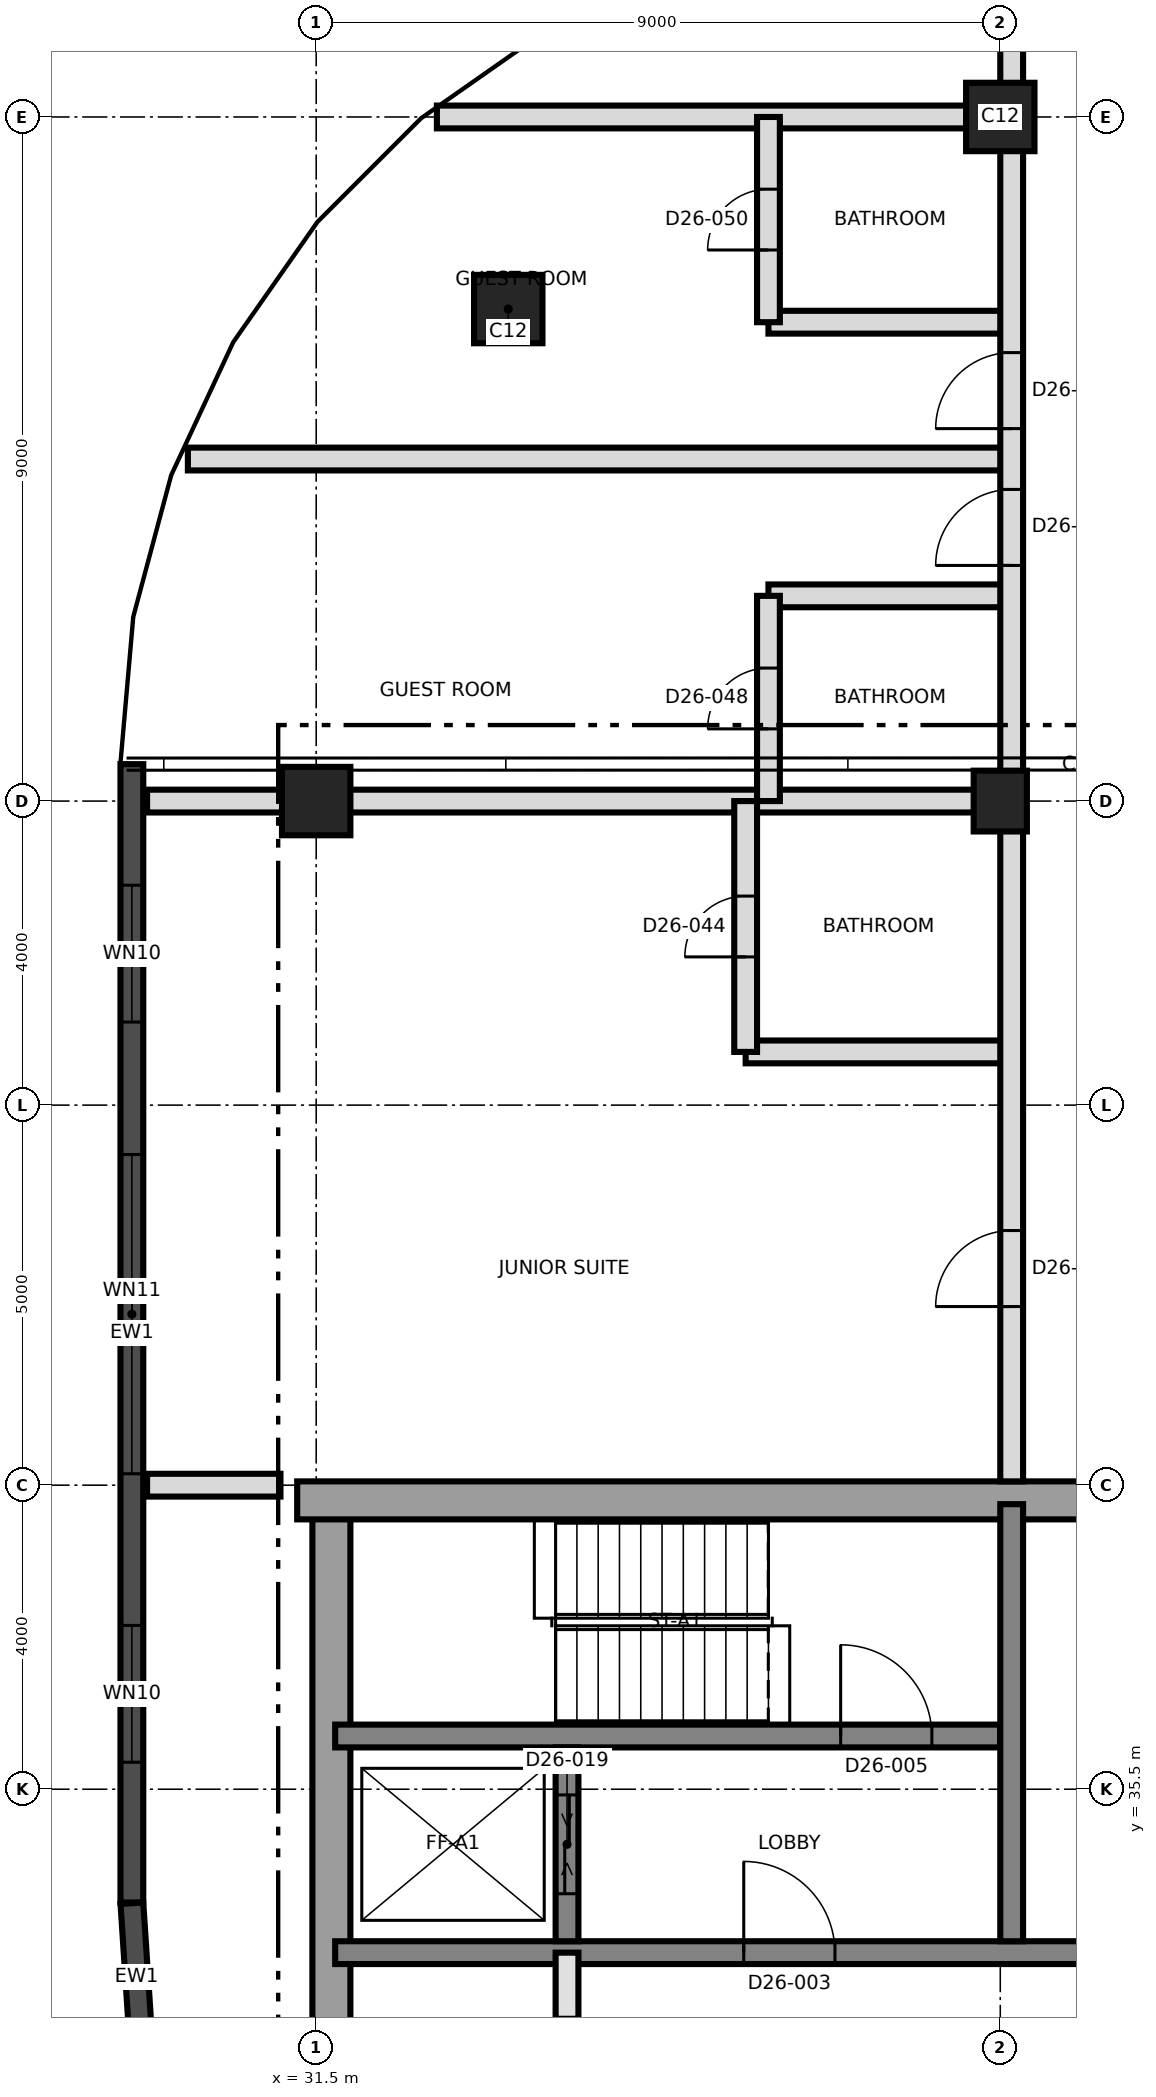
"""IFC4 building model, lengths in metres.
Left out: names, types, materials, properties, quantities, classifications, styles, units other than length and angle.
Written with IfcOpenShell. Run it as: python <this file> out.ifc"""

import sys

from ifc_helpers import new_model, si_unit, direction, frame, frame_2d, origin, origin_2d, place, context, subcontext, project, spatial, rectangle, extrude, element, fill, save


model = new_model("IFC4")
c1 = context("Model", 3, precision=1e-05, world=origin(), true_north=direction((0.0, 1.0)))
c2 = subcontext(c1, "Body", "Model", "MODEL_VIEW")
j1 = project(units=[si_unit("LENGTHUNIT", "METRE"), si_unit("PLANEANGLEUNIT", "RADIAN")], contexts=[c1])
p1 = place(None, origin())
s1 = spatial("IfcSite", under=j1, at=p1, CompositionType="ELEMENT")
p2 = place(p1, origin())
s2 = spatial("IfcBuilding", under=s1, at=p2, CompositionType="ELEMENT")
p3 = place(p2, frame((0.0, 0.0, 232.8)))
s3 = spatial("IfcBuildingStorey", under=s2, at=p3, CompositionType="ELEMENT", Elevation=232.8)
p4 = place(p3, frame((31.7, 21.75, 0.0), z_axis=(0.0, 0.0, 1.0), x_axis=(0.0, 1.0, 0.0)))
e1 = element("IfcWall", 1, at=p4, inside=s3, PredefinedType="SHEAR", context=c2, shape_type="SweptSolid", body=[
    extrude(rectangle(XDim=17.5, YDim=0.5, at=frame_2d((8.75, 0.0))), origin(), (0.0, 0.0, 1.0), 3.7),
])
p5 = place(p3, frame((31.25, 39.3, 0.0), z_axis=(0.0, 0.0, 1.0), x_axis=(1.0, 0.0, 0.0)))
e2 = element("IfcWall", 2, at=p5, inside=s3, PredefinedType="SHEAR", context=c2, shape_type="SweptSolid", body=[
    extrude(rectangle(XDim=27.0, YDim=0.5, at=frame_2d((13.5, 0.0))), origin(), (0.0, 0.0, 1.0), 3.7),
])
p6 = place(p5, frame((10.45, 0.0, 0.0)))
e3 = element("IfcOpeningElement", 3, at=p6, cuts=e2, PredefinedType="OPENING", context=c2, shape_type="SweptSolid", body=[
    extrude(rectangle(XDim=1.2, YDim=2.1, at=frame_2d((0.6, 1.05))), frame((0.0, 0.26, 0.0), z_axis=(0.0, -1.0, 0.0), x_axis=(1.0, 0.0, 0.0)), (0.0, 0.0, 1.0), 0.52),
])
p7 = place(p3, frame((31.75, 33.35, 0.0), z_axis=(0.0, 0.0, 1.0), x_axis=(1.0, 0.0, 0.0)))
e4 = element("IfcWall", 4, at=p7, inside=s3, PredefinedType="SHEAR", context=c2, shape_type="SweptSolid", body=[
    extrude(rectangle(XDim=26.5, YDim=0.3, at=frame_2d((13.25, 0.0))), origin(), (0.0, 0.0, 1.0), 3.7),
])
p8 = place(p7, frame((13.9, 0.0, 0.0)))
e5 = element("IfcOpeningElement", 5, at=p8, cuts=e4, PredefinedType="OPENING", context=c2, shape_type="SweptSolid", body=[
    extrude(rectangle(XDim=1.4, YDim=2.1, at=frame_2d((0.7, 1.05))), frame((0.0, 0.16, 0.0), z_axis=(0.0, -1.0, 0.0), x_axis=(1.0, 0.0, 0.0)), (0.0, 0.0, 1.0), 0.32),
])
p9 = place(p7, frame((5.375, 0.0, 0.0)))
e6 = element("IfcOpeningElement", 6, at=p9, cuts=e4, PredefinedType="OPENING", context=c2, shape_type="SweptSolid", body=[
    extrude(rectangle(XDim=1.2, YDim=2.1, at=frame_2d((0.6, 1.05))), frame((0.0, 0.16, 0.0), z_axis=(0.0, -1.0, 0.0), x_axis=(1.0, 0.0, 0.0)), (0.0, 0.0, 1.0), 0.32),
])
p10 = place(p7, frame((19.925, 0.0, 0.0)))
e7 = element("IfcOpeningElement", 7, at=p10, cuts=e4, PredefinedType="OPENING", context=c2, shape_type="SweptSolid", body=[
    extrude(rectangle(XDim=1.2, YDim=2.1, at=frame_2d((0.6, 1.05))), frame((0.0, 0.16, 0.0), z_axis=(0.0, -1.0, 0.0), x_axis=(1.0, 0.0, 0.0)), (0.0, 0.0, 1.0), 0.32),
])
p11 = place(p3, frame((31.75, 36.2, 0.0), z_axis=(0.0, 0.0, 1.0), x_axis=(1.0, 0.0, 0.0)))
e8 = element("IfcWall", 8, at=p11, inside=s3, PredefinedType="SHEAR", context=c2, shape_type="SweptSolid", body=[
    extrude(rectangle(XDim=8.75, YDim=0.3, at=frame_2d((4.375, 0.0))), origin(), (0.0, 0.0, 1.0), 3.7),
])
p12 = place(p11, frame((6.65, 0.0, 0.0)))
e9 = element("IfcOpeningElement", 9, at=p12, cuts=e8, PredefinedType="OPENING", context=c2, shape_type="SweptSolid", body=[
    extrude(rectangle(XDim=1.2, YDim=2.1, at=frame_2d((0.6, 1.05))), frame((0.0, 0.16, 0.0), z_axis=(0.0, -1.0, 0.0), x_axis=(1.0, 0.0, 0.0)), (0.0, 0.0, 1.0), 0.32),
])
p13 = place(p3, frame((40.65, 33.5, 0.0), z_axis=(0.0, 0.0, 1.0), x_axis=(0.0, 1.0, 0.0)))
e10 = element("IfcWall", 10, at=p13, inside=s3, PredefinedType="SHEAR", context=c2, shape_type="SweptSolid", body=[
    extrude(rectangle(XDim=5.75, YDim=0.3, at=frame_2d((2.875, 0.0))), origin(), (0.0, 0.0, 1.0), 3.7),
])
p14 = place(p3, frame((34.8, 33.5, 0.0), z_axis=(0.0, 0.0, 1.0), x_axis=(0.0, 1.0, 0.0)))
e11 = element("IfcWall", 11, at=p14, inside=s3, PredefinedType="SHEAR", context=c2, shape_type="SweptSolid", body=[
    extrude(rectangle(XDim=2.55, YDim=0.3, at=frame_2d((1.275, 0.0))), origin(), (0.0, 0.0, 1.0), 3.7),
])
p15 = place(p14, frame((0.625, 0.0, 0.0)))
e12 = element("IfcOpeningElement", 12, at=p15, cuts=e11, PredefinedType="OPENING", context=c2, shape_type="SweptSolid", body=[
    extrude(rectangle(XDim=1.3, YDim=2.4, at=frame_2d((0.65, 1.2))), frame((0.0, 0.16, 0.0), z_axis=(0.0, -1.0, 0.0), x_axis=(1.0, 0.0, 0.0)), (0.0, 0.0, 1.0), 0.32),
])
p16 = place(p3, frame((31.5, 48.5, 0.0), z_axis=(0.0, 0.0, 1.0), x_axis=(1.0, 0.0, 0.0)))
e13 = element("IfcColumn", 13, at=p16, inside=s3, PredefinedType="COLUMN", context=c2, shape_type="SweptSolid", body=[
    extrude(rectangle(XDim=0.9, YDim=0.9, at=origin_2d()), origin(), (0.0, 0.0, 1.0), 3.7),
])
p17 = place(p3, frame((40.5, 48.5, 0.0), z_axis=(0.0, 0.0, 1.0), x_axis=(0.0, 1.0, 0.0)))
e14 = element("IfcColumn", 14, at=p17, inside=s3, PredefinedType="COLUMN", context=c2, shape_type="SweptSolid", body=[
    extrude(rectangle(XDim=0.8, YDim=0.7, at=origin_2d()), origin(), (0.0, 0.0, 1.0), 3.7),
])
for number, where, z_axis, x_axis in (
    (15, (34.027, 54.973, 0.0), (0.0, 0.0, 1.0), (1.0, 0.0, 0.0)),
    (16, (40.5, 57.5, 0.0), (0.0, 0.0, 1.0), (1.0, 0.0, 0.0)),
):
    element("IfcColumn", number, at=place(p3, frame(where, z_axis=z_axis, x_axis=x_axis)), inside=s3, PredefinedType="COLUMN", context=c2, shape_type="SweptSolid", body=[
        extrude(rectangle(XDim=0.9, YDim=0.9, at=origin_2d()), origin(), (0.0, 0.0, 1.0), 3.7),
    ])
p18 = place(p3, frame((29.075, 48.986, 0.0), z_axis=(0.0, 0.0, 1.0), x_axis=(0.0, -1.0, 0.0)))
e17 = element("IfcWall", 17, at=p18, inside=s3, PredefinedType="SOLIDWALL", context=c2, shape_type="SweptSolid", body=[
    extrude(rectangle(XDim=14.976, YDim=0.3, at=frame_2d((7.488, 0.0))), origin(), (0.0, 0.0, 1.0), 3.4),
])
p19 = place(p18, frame((1.593, 0.0, 0.3)))
e18 = element("IfcOpeningElement", 18, at=p19, cuts=e17, PredefinedType="OPENING", context=c2, shape_type="SweptSolid", body=[
    extrude(rectangle(XDim=1.8, YDim=2.4, at=frame_2d((0.9, 1.2))), frame((0.0, 0.16, 0.0), z_axis=(0.0, -1.0, 0.0), x_axis=(1.0, 0.0, 0.0)), (0.0, 0.0, 1.0), 0.32),
])
p20 = place(p18, frame((5.136, 0.0, 0.9)))
e19 = element("IfcOpeningElement", 19, at=p20, cuts=e17, PredefinedType="OPENING", context=c2, shape_type="SweptSolid", body=[
    extrude(rectangle(XDim=4.2, YDim=1.5, at=frame_2d((2.1, 0.75))), frame((0.0, 0.16, 0.0), z_axis=(0.0, -1.0, 0.0), x_axis=(1.0, 0.0, 0.0)), (0.0, 0.0, 1.0), 0.32),
])
p21 = place(p18, frame((11.331, 0.0, 0.3)))
e20 = element("IfcOpeningElement", 20, at=p21, cuts=e17, PredefinedType="OPENING", context=c2, shape_type="SweptSolid", body=[
    extrude(rectangle(XDim=1.8, YDim=2.4, at=frame_2d((0.9, 1.2))), frame((0.0, 0.16, 0.0), z_axis=(0.0, -1.0, 0.0), x_axis=(1.0, 0.0, 0.0)), (0.0, 0.0, 1.0), 0.32),
])
p22 = place(p3, frame((29.075, 34.0, 0.0), z_axis=(0.0, 0.0, 1.0), x_axis=(0.065359381612, -0.997861789646, 0.0)))
e21 = element("IfcWall", 21, at=p22, inside=s3, PredefinedType="SOLIDWALL", context=c2, shape_type="SweptSolid", body=[
    extrude(rectangle(XDim=1.942, YDim=0.3, at=frame_2d((0.971, 0.0))), origin(), (0.0, 0.0, 1.0), 3.4),
])
p23 = place(p3, frame((34.8, 30.65, 0.0), z_axis=(0.0, 0.0, 1.0), x_axis=(0.0, 1.0, 0.0)))
e22 = element("IfcWall", 22, at=p23, inside=s3, PredefinedType="SOLIDWALL", context=c2, shape_type="SweptSolid", body=[
    extrude(rectangle(XDim=2.7, YDim=0.3, at=frame_2d((1.35, 0.0))), origin(), (0.0, 0.0, 1.0), 3.4),
])
p24 = place(p23, frame((0.85, 0.0, 0.0)))
e23 = element("IfcOpeningElement", 23, at=p24, cuts=e22, PredefinedType="OPENING", context=c2, shape_type="SweptSolid", body=[
    extrude(rectangle(XDim=1.0, YDim=2.1, at=frame_2d((0.5, 1.05))), frame((0.0, 0.16, 0.0), z_axis=(0.0, -1.0, 0.0), x_axis=(1.0, 0.0, 0.0)), (0.0, 0.0, 1.0), 0.32),
])
p25 = place(p3, frame((29.275, 39.5, 0.0), z_axis=(0.0, 0.0, 1.0), x_axis=(1.0, 0.0, 0.0)))
e24 = element("IfcWall", 24, at=p25, inside=s3, PredefinedType="PARTITIONING", context=c2, shape_type="SweptSolid", body=[
    extrude(rectangle(XDim=1.755, YDim=0.3, at=frame_2d((0.877, 0.0))), origin(), (0.0, 0.0, 1.0), 3.4),
])
p26 = place(p3, frame((37.15, 45.2, 0.0), z_axis=(0.0, 0.0, 1.0), x_axis=(1.0, 0.0, 0.0)))
e25 = element("IfcWall", 25, at=p26, inside=s3, PredefinedType="PARTITIONING", context=c2, shape_type="SweptSolid", body=[
    extrude(rectangle(XDim=3.5, YDim=0.3, at=frame_2d((1.75, 0.0))), origin(), (0.0, 0.0, 1.0), 3.4),
])
p27 = place(p3, frame((29.275, 48.5, 0.0), z_axis=(0.0, 0.0, 1.0), x_axis=(1.0, 0.0, 0.0)))
e26 = element("IfcWall", 26, at=p27, inside=s3, PredefinedType="PARTITIONING", context=c2, shape_type="SweptSolid", body=[
    extrude(rectangle(XDim=11.375, YDim=0.3, at=frame_2d((5.688, 0.0))), origin(), (0.0, 0.0, 1.0), 3.4),
])
p28 = place(p3, frame((37.45, 51.2, 0.0), z_axis=(0.0, 0.0, 1.0), x_axis=(1.0, 0.0, 0.0)))
e27 = element("IfcWall", 27, at=p28, inside=s3, PredefinedType="PARTITIONING", context=c2, shape_type="SweptSolid", body=[
    extrude(rectangle(XDim=3.2, YDim=0.3, at=frame_2d((1.6, 0.0))), origin(), (0.0, 0.0, 1.0), 3.4),
])
p29 = place(p3, frame((29.812, 53.0, 0.0), z_axis=(0.0, 0.0, 1.0), x_axis=(1.0, 0.0, 0.0)))
e28 = element("IfcWall", 28, at=p29, inside=s3, PredefinedType="PARTITIONING", context=c2, shape_type="SweptSolid", body=[
    extrude(rectangle(XDim=10.838, YDim=0.3, at=frame_2d((5.419, 0.0))), origin(), (0.0, 0.0, 1.0), 3.4),
])
p30 = place(p3, frame((37.45, 54.8, 0.0), z_axis=(0.0, 0.0, 1.0), x_axis=(1.0, 0.0, 0.0)))
e29 = element("IfcWall", 29, at=p30, inside=s3, PredefinedType="PARTITIONING", context=c2, shape_type="SweptSolid", body=[
    extrude(rectangle(XDim=3.2, YDim=0.3, at=frame_2d((1.6, 0.0))), origin(), (0.0, 0.0, 1.0), 3.4),
])
p31 = place(p3, frame((33.088, 57.5, 0.0), z_axis=(0.0, 0.0, 1.0), x_axis=(1.0, 0.0, 0.0)))
e30 = element("IfcWall", 30, at=p31, inside=s3, PredefinedType="PARTITIONING", context=c2, shape_type="SweptSolid", body=[
    extrude(rectangle(XDim=7.562, YDim=0.3, at=frame_2d((3.781, 0.0))), origin(), (0.0, 0.0, 1.0), 3.4),
])
p32 = place(p3, frame((37.15, 45.2, 0.0), z_axis=(0.0, 0.0, 1.0), x_axis=(0.0, 1.0, 0.0)))
e31 = element("IfcWall", 31, at=p32, inside=s3, PredefinedType="PARTITIONING", context=c2, shape_type="SweptSolid", body=[
    extrude(rectangle(XDim=3.3, YDim=0.3, at=frame_2d((1.65, 0.0))), origin(), (0.0, 0.0, 1.0), 3.4),
])
p33 = place(p32, frame((1.25, 0.0, 0.0)))
e32 = element("IfcOpeningElement", 32, at=p33, cuts=e31, PredefinedType="OPENING", context=c2, shape_type="SweptSolid", body=[
    extrude(rectangle(XDim=0.8, YDim=2.1, at=frame_2d((0.4, 1.05))), frame((0.0, 0.16, 0.0), z_axis=(0.0, -1.0, 0.0), x_axis=(1.0, 0.0, 0.0)), (0.0, 0.0, 1.0), 0.32),
])
p34 = place(p3, frame((37.45, 48.5, 0.0), z_axis=(0.0, 0.0, 1.0), x_axis=(0.0, 1.0, 0.0)))
e33 = element("IfcWall", 33, at=p34, inside=s3, PredefinedType="PARTITIONING", context=c2, shape_type="SweptSolid", body=[
    extrude(rectangle(XDim=2.7, YDim=0.3, at=frame_2d((1.35, 0.0))), origin(), (0.0, 0.0, 1.0), 3.4),
])
p35 = place(p34, frame((0.95, 0.0, 0.0)))
e34 = element("IfcOpeningElement", 34, at=p35, cuts=e33, PredefinedType="OPENING", context=c2, shape_type="SweptSolid", body=[
    extrude(rectangle(XDim=0.8, YDim=2.1, at=frame_2d((0.4, 1.05))), frame((0.0, 0.16, 0.0), z_axis=(0.0, -1.0, 0.0), x_axis=(1.0, 0.0, 0.0)), (0.0, 0.0, 1.0), 0.32),
])
p36 = place(p3, frame((37.45, 54.8, 0.0), z_axis=(0.0, 0.0, 1.0), x_axis=(0.0, 1.0, 0.0)))
e35 = element("IfcWall", 35, at=p36, inside=s3, PredefinedType="PARTITIONING", context=c2, shape_type="SweptSolid", body=[
    extrude(rectangle(XDim=2.7, YDim=0.3, at=frame_2d((1.35, 0.0))), origin(), (0.0, 0.0, 1.0), 3.4),
])
p37 = place(p36, frame((0.95, 0.0, 0.0)))
e36 = element("IfcOpeningElement", 36, at=p37, cuts=e35, PredefinedType="OPENING", context=c2, shape_type="SweptSolid", body=[
    extrude(rectangle(XDim=0.8, YDim=2.1, at=frame_2d((0.4, 1.05))), frame((0.0, 0.16, 0.0), z_axis=(0.0, -1.0, 0.0), x_axis=(1.0, 0.0, 0.0)), (0.0, 0.0, 1.0), 0.32),
])
p38 = place(p3, frame((40.65, 39.55, 0.0), z_axis=(0.0, 0.0, 1.0), x_axis=(0.0, 1.0, 0.0)))
e37 = element("IfcWall", 37, at=p38, inside=s3, PredefinedType="PARTITIONING", context=c2, shape_type="SweptSolid", body=[
    extrude(rectangle(XDim=19.0, YDim=0.3, at=frame_2d((9.5, 0.0))), origin(), (0.0, 0.0, 1.0), 3.4),
])
p39 = place(p38, frame((2.3, 0.0, 0.0)))
e38 = element("IfcOpeningElement", 38, at=p39, cuts=e37, PredefinedType="OPENING", context=c2, shape_type="SweptSolid", body=[
    extrude(rectangle(XDim=1.0, YDim=2.4, at=frame_2d((0.5, 1.2))), frame((0.0, 0.16, 0.0), z_axis=(0.0, -1.0, 0.0), x_axis=(1.0, 0.0, 0.0)), (0.0, 0.0, 1.0), 0.32),
])
p40 = place(p38, frame((12.05, 0.0, 0.0)))
e39 = element("IfcOpeningElement", 39, at=p40, cuts=e37, PredefinedType="OPENING", context=c2, shape_type="SweptSolid", body=[
    extrude(rectangle(XDim=1.0, YDim=2.1, at=frame_2d((0.5, 1.05))), frame((0.0, 0.16, 0.0), z_axis=(0.0, -1.0, 0.0), x_axis=(1.0, 0.0, 0.0)), (0.0, 0.0, 1.0), 0.32),
])
p41 = place(p38, frame((13.85, 0.0, 0.0)))
e40 = element("IfcOpeningElement", 40, at=p41, cuts=e37, PredefinedType="OPENING", context=c2, shape_type="SweptSolid", body=[
    extrude(rectangle(XDim=1.0, YDim=2.1, at=frame_2d((0.5, 1.05))), frame((0.0, 0.16, 0.0), z_axis=(0.0, -1.0, 0.0), x_axis=(1.0, 0.0, 0.0)), (0.0, 0.0, 1.0), 0.32),
])
p42 = place(p19, origin())
e41 = element("IfcWindow", 41, at=p42, inside=s3, PartitioningType="SINGLE_PANEL", PredefinedType="WINDOW", context=c2, shape_type="SweptSolid", body=[
    extrude(rectangle(XDim=1.8, YDim=2.4, at=frame_2d((0.9, 1.2))), frame((0.0, 0.03, 0.0), z_axis=(0.0, -1.0, 0.0), x_axis=(1.0, 0.0, 0.0)), (0.0, 0.0, 1.0), 0.06),
])
fill(e18, e41)
p43 = place(p20, origin())
e42 = element("IfcWindow", 42, at=p43, inside=s3, PartitioningType="SINGLE_PANEL", PredefinedType="WINDOW", context=c2, shape_type="SweptSolid", body=[
    extrude(rectangle(XDim=4.2, YDim=1.5, at=frame_2d((2.1, 0.75))), frame((0.0, 0.03, 0.0), z_axis=(0.0, -1.0, 0.0), x_axis=(1.0, 0.0, 0.0)), (0.0, 0.0, 1.0), 0.06),
])
fill(e19, e42)
p44 = place(p21, origin())
e43 = element("IfcWindow", 43, at=p44, inside=s3, PartitioningType="SINGLE_PANEL", PredefinedType="WINDOW", context=c2, shape_type="SweptSolid", body=[
    extrude(rectangle(XDim=1.8, YDim=2.4, at=frame_2d((0.9, 1.2))), frame((0.0, 0.03, 0.0), z_axis=(0.0, -1.0, 0.0), x_axis=(1.0, 0.0, 0.0)), (0.0, 0.0, 1.0), 0.06),
])
fill(e20, e43)
p45 = place(p9, origin())
e44 = element("IfcDoor", 44, at=p45, inside=s3, OperationType="SINGLE_SWING_LEFT", PredefinedType="DOOR", context=c2, shape_type="SweptSolid", body=[
    extrude(rectangle(XDim=1.2, YDim=2.1, at=frame_2d((0.6, 1.05))), frame((0.0, 0.025, 0.0), z_axis=(0.0, -1.0, 0.0), x_axis=(1.0, 0.0, 0.0)), (0.0, 0.0, 1.0), 0.05),
])
fill(e6, e44)
p46 = place(p12, origin())
e45 = element("IfcDoor", 45, at=p46, inside=s3, OperationType="SINGLE_SWING_RIGHT", PredefinedType="DOOR", context=c2, shape_type="SweptSolid", body=[
    extrude(rectangle(XDim=1.2, YDim=2.1, at=frame_2d((0.6, 1.05))), frame((0.0, 0.025, 0.0), z_axis=(0.0, -1.0, 0.0), x_axis=(1.0, 0.0, 0.0)), (0.0, 0.0, 1.0), 0.05),
])
fill(e9, e45)
p47 = place(p15, origin())
e46 = element("IfcDoor", 46, at=p47, inside=s3, OperationType="SLIDING_TO_LEFT", PredefinedType="DOOR", context=c2, shape_type="SweptSolid", body=[
    extrude(rectangle(XDim=1.3, YDim=2.4, at=frame_2d((0.65, 1.2))), frame((0.0, 0.025, 0.0), z_axis=(0.0, -1.0, 0.0), x_axis=(1.0, 0.0, 0.0)), (0.0, 0.0, 1.0), 0.05),
])
fill(e12, e46)
p48 = place(p33, origin())
e47 = element("IfcDoor", 47, at=p48, inside=s3, OperationType="SINGLE_SWING_LEFT", PredefinedType="DOOR", context=c2, shape_type="SweptSolid", body=[
    extrude(rectangle(XDim=0.8, YDim=2.1, at=frame_2d((0.4, 1.05))), frame((0.0, 0.025, 0.0), z_axis=(0.0, -1.0, 0.0), x_axis=(1.0, 0.0, 0.0)), (0.0, 0.0, 1.0), 0.05),
])
fill(e32, e47)
p49 = place(p39, origin())
e48 = element("IfcDoor", 48, at=p49, inside=s3, OperationType="SINGLE_SWING_LEFT", PredefinedType="DOOR", context=c2, shape_type="SweptSolid", body=[
    extrude(rectangle(XDim=1.0, YDim=2.4, at=frame_2d((0.5, 1.2))), frame((0.0, 0.025, 0.0), z_axis=(0.0, -1.0, 0.0), x_axis=(1.0, 0.0, 0.0)), (0.0, 0.0, 1.0), 0.05),
])
fill(e38, e48)
p50 = place(p35, origin())
e49 = element("IfcDoor", 49, at=p50, inside=s3, OperationType="SINGLE_SWING_RIGHT", PredefinedType="DOOR", context=c2, shape_type="SweptSolid", body=[
    extrude(rectangle(XDim=0.8, YDim=2.1, at=frame_2d((0.4, 1.05))), frame((0.0, 0.025, 0.0), z_axis=(0.0, -1.0, 0.0), x_axis=(1.0, 0.0, 0.0)), (0.0, 0.0, 1.0), 0.05),
])
fill(e34, e49)
p51 = place(p40, origin())
e50 = element("IfcDoor", 50, at=p51, inside=s3, OperationType="SINGLE_SWING_LEFT", PredefinedType="DOOR", context=c2, shape_type="SweptSolid", body=[
    extrude(rectangle(XDim=1.0, YDim=2.1, at=frame_2d((0.5, 1.05))), frame((0.0, 0.025, 0.0), z_axis=(0.0, -1.0, 0.0), x_axis=(1.0, 0.0, 0.0)), (0.0, 0.0, 1.0), 0.05),
])
fill(e39, e50)
p52 = place(p37, origin())
e51 = element("IfcDoor", 51, at=p52, inside=s3, OperationType="SINGLE_SWING_LEFT", PredefinedType="DOOR", context=c2, shape_type="SweptSolid", body=[
    extrude(rectangle(XDim=0.8, YDim=2.1, at=frame_2d((0.4, 1.05))), frame((0.0, 0.025, 0.0), z_axis=(0.0, -1.0, 0.0), x_axis=(1.0, 0.0, 0.0)), (0.0, 0.0, 1.0), 0.05),
])
fill(e36, e51)
p53 = place(p41, origin())
e52 = element("IfcDoor", 52, at=p53, inside=s3, OperationType="SINGLE_SWING_LEFT", PredefinedType="DOOR", context=c2, shape_type="SweptSolid", body=[
    extrude(rectangle(XDim=1.0, YDim=2.1, at=frame_2d((0.5, 1.05))), frame((0.0, 0.025, 0.0), z_axis=(0.0, -1.0, 0.0), x_axis=(1.0, 0.0, 0.0)), (0.0, 0.0, 1.0), 0.05),
])
fill(e40, e52)
save(model, sys.argv[1])
